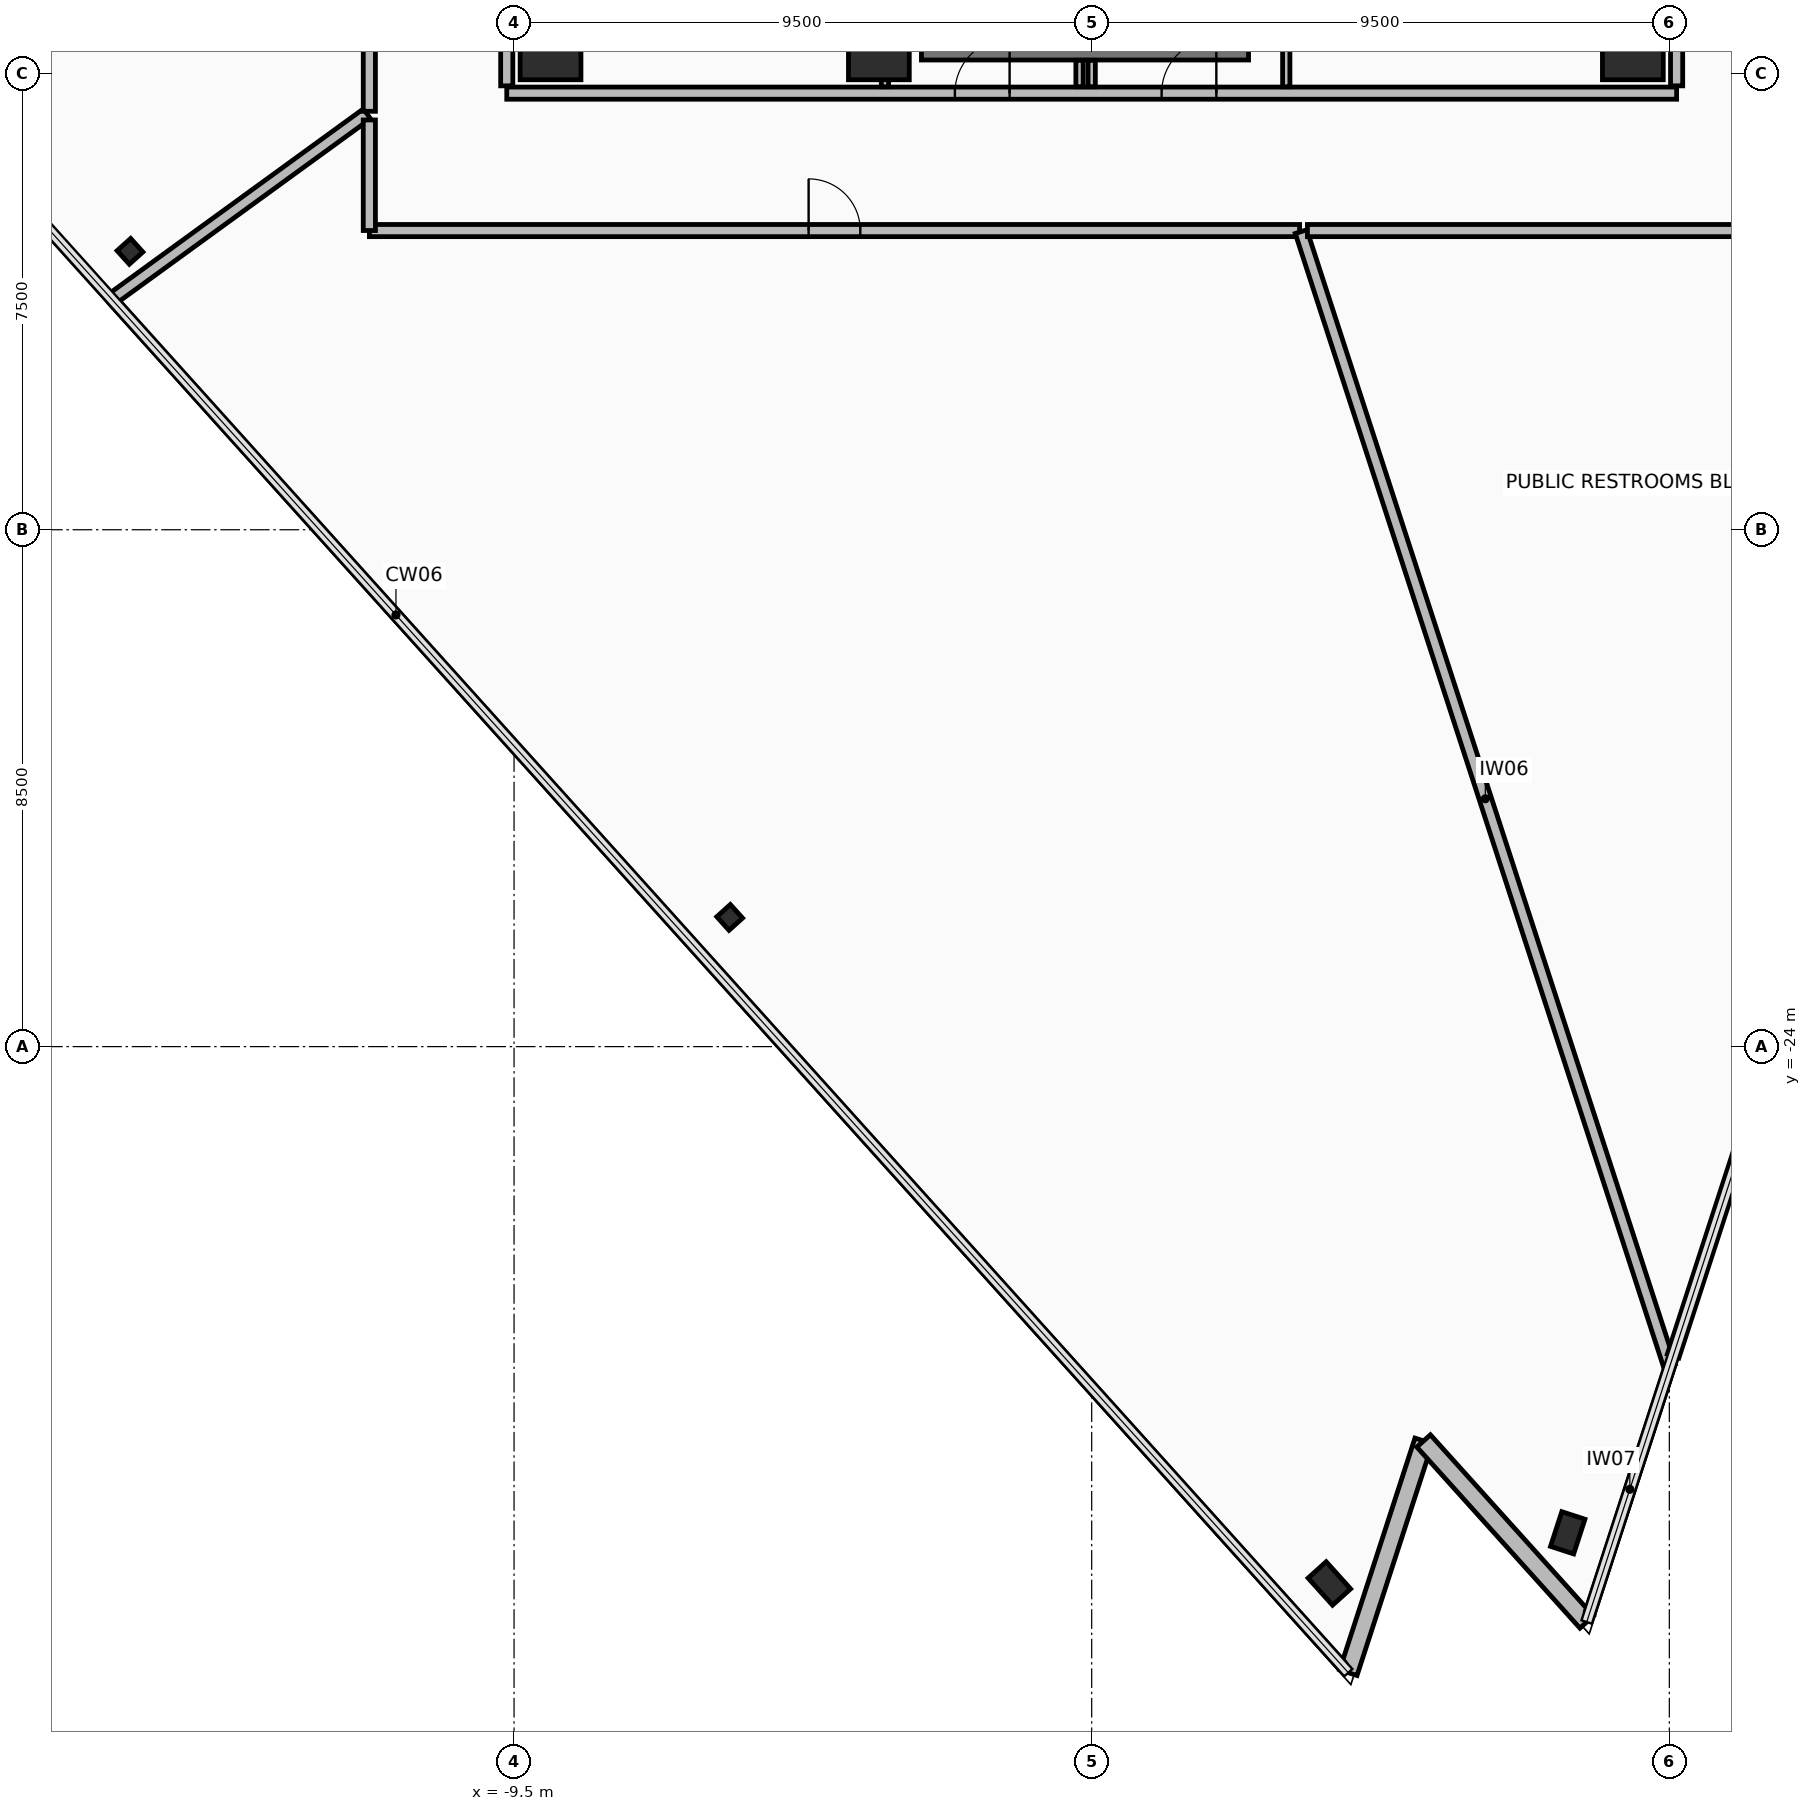
"""IFC4 building model, lengths in metres.
Left out: names, types, materials, properties, quantities, classifications, styles, units other than length and angle.
Written with IfcOpenShell. Run it as: python <this file> out.ifc"""

import sys

from ifc_helpers import new_model, si_unit, direction, frame, frame_2d, origin, origin_2d, place, context, subcontext, project, spatial, rectangle, hollow_rectangle, extrude, element, fill, save


model = new_model("IFC4")
c1 = context("Model", 3, precision=1e-05, world=origin(), true_north=direction((0.0, 1.0)))
c2 = subcontext(c1, "Body", "Model", "MODEL_VIEW")
j1 = project(units=[si_unit("LENGTHUNIT", "METRE"), si_unit("PLANEANGLEUNIT", "RADIAN")], contexts=[c1])
p1 = place(None, origin())
s1 = spatial("IfcSite", under=j1, at=p1, CompositionType="ELEMENT")
p2 = place(p1, origin())
s2 = spatial("IfcBuilding", under=s1, at=p2, CompositionType="ELEMENT")
p3 = place(p2, frame((0.0, 0.0, 302.15)))
s3 = spatial("IfcBuildingStorey", under=s2, at=p3, CompositionType="ELEMENT", Elevation=302.15)
for number, where, z_axis, x_axis in (
    (1, (-8.9, -7.6, 0.0), (0.0, 0.0, 1.0), (1.0, 0.0, 0.0)),
    (2, (-3.5, -7.6, 0.0), (0.0, 0.0, 1.0), (1.0, 0.0, 0.0)),
    (3, (8.9, -7.6, 0.0), (0.0, 0.0, 1.0), (1.0, 0.0, 0.0)),
):
    element("IfcColumn", number, at=place(p3, frame(where, z_axis=z_axis, x_axis=x_axis)), inside=s3, PredefinedType="COLUMN", context=c2, shape_type="SweptSolid", body=[
        extrude(rectangle(XDim=1.0, YDim=1.0, at=origin_2d()), origin(), (0.0, 0.0, 1.0), 4.15),
    ])
for number, where, z_axis, x_axis in (
    (4, (-15.816, -10.922, 0.0), (0.0, 0.0, 1.0), (-0.669, 0.743, 0.0)),
    (5, (-5.954, -21.875, 0.0), (0.0, 0.0, 1.0), (-0.669, 0.743, 0.0)),
):
    element("IfcColumn", number, at=place(p3, frame(where, z_axis=z_axis, x_axis=x_axis)), inside=s3, PredefinedType="COLUMN", context=c2, shape_type="SweptSolid", body=[
        extrude(hollow_rectangle(XDim=0.3, YDim=0.3, WallThickness=0.02, at=origin_2d()), origin(), (0.0, 0.0, 1.0), 4.15),
    ])
for number, where, z_axis, x_axis in (
    (6, (3.909, -32.829, 0.0), (0.0, 0.0, 1.0), (-0.669, 0.743, 0.0)),
    (7, (7.829, -31.996, 0.0), (0.0, 0.0, 1.0), (0.309, 0.951, 0.0)),
):
    element("IfcColumn", number, at=place(p3, frame(where, z_axis=z_axis, x_axis=x_axis)), inside=s3, PredefinedType="COLUMN", context=c2, shape_type="SweptSolid", body=[
        extrude(hollow_rectangle(XDim=0.4, YDim=0.6, WallThickness=0.03, at=origin_2d()), origin(), (0.0, 0.0, 1.0), 4.15),
    ])
p4 = place(p3, frame((4.221, -34.296, 0.0), z_axis=(0.0, 0.0, 1.0), x_axis=(0.309018580232, 0.951056001018, 0.0)))
e8 = element("IfcWall", 8, at=p4, inside=s3, PredefinedType="STANDARD", context=c2, shape_type="SweptSolid", body=[
    extrude(rectangle(XDim=4.008, YDim=0.3, at=frame_2d((2.004, 0.0))), origin(), (0.0, 0.0, 1.0), 3.295),
])
p5 = place(p3, frame((5.459, -30.484, 0.0), z_axis=(0.0, 0.0, 1.0), x_axis=(0.669132983361, -0.743142685208, 0.0)))
e9 = element("IfcWall", 9, at=p5, inside=s3, PredefinedType="STANDARD", context=c2, shape_type="SweptSolid", body=[
    extrude(rectangle(XDim=4.008, YDim=0.3, at=frame_2d((2.004, 0.0))), origin(), (0.0, 0.0, 1.0), 3.295),
])
p6 = place(p3, frame((-2.8, -7.6, 0.0), z_axis=(0.0, 0.0, 1.0), x_axis=(1.0, 0.0, 0.0)))
e10 = element("IfcWall", 10, at=p6, inside=s3, PredefinedType="SHEAR", context=c2, shape_type="SweptSolid", body=[
    extrude(rectangle(XDim=5.38, YDim=0.35, at=frame_2d((2.69, 0.0))), origin(), (0.0, 0.0, 1.0), 3.95),
])
p7 = place(p3, frame((-9.62, -8.32, 0.0), z_axis=(0.0, 0.0, 1.0), x_axis=(1.0, 0.0, 0.0)))
e11 = element("IfcWall", 11, at=p7, inside=s3, PredefinedType="PARTITIONING", context=c2, shape_type="SweptSolid", body=[
    extrude(rectangle(XDim=19.24, YDim=0.2, at=frame_2d((9.62, 0.0))), origin(), (0.0, 0.0, 1.0), 3.445),
])
p8 = place(p7, frame((7.37, 0.0, 0.0)))
e12 = element("IfcOpeningElement", 12, at=p8, cuts=e11, PredefinedType="OPENING", context=c2, shape_type="SweptSolid", body=[
    extrude(rectangle(XDim=0.9, YDim=2.1, at=frame_2d((0.45, 1.05))), frame((0.0, 0.11, 0.0), z_axis=(0.0, -1.0, 0.0), x_axis=(1.0, 0.0, 0.0)), (0.0, 0.0, 1.0), 0.22),
])
p9 = place(p7, frame((10.77, 0.0, 0.0)))
e13 = element("IfcOpeningElement", 13, at=p9, cuts=e11, PredefinedType="OPENING", context=c2, shape_type="SweptSolid", body=[
    extrude(rectangle(XDim=0.9, YDim=2.1, at=frame_2d((0.45, 1.05))), frame((0.0, 0.11, 0.0), z_axis=(0.0, -1.0, 0.0), x_axis=(1.0, 0.0, 0.0)), (0.0, 0.0, 1.0), 0.22),
])
p10 = place(p3, frame((-9.62, 8.2, 0.0), z_axis=(0.0, 0.0, 1.0), x_axis=(0.0, -1.0, 0.0)))
e14 = element("IfcWall", 14, at=p10, inside=s3, PredefinedType="PARTITIONING", context=c2, shape_type="SweptSolid", body=[
    extrude(rectangle(XDim=16.4, YDim=0.2, at=frame_2d((8.2, 0.0))), origin(), (0.0, 0.0, 1.0), 3.445),
])
p11 = place(p10, frame((12.65, 0.0, 0.0)))
e15 = element("IfcOpeningElement", 15, at=p11, cuts=e14, PredefinedType="OPENING", context=c2, shape_type="SweptSolid", body=[
    extrude(rectangle(XDim=1.1, YDim=2.15, at=frame_2d((0.55, 1.075))), frame((0.0, 0.11, 0.0), z_axis=(0.0, -1.0, 0.0), x_axis=(1.0, 0.0, 0.0)), (0.0, 0.0, 1.0), 0.22),
])
p12 = place(p3, frame((9.62, -8.2, 0.0), z_axis=(0.0, 0.0, 1.0), x_axis=(0.0, 1.0, 0.0)))
e16 = element("IfcWall", 16, at=p12, inside=s3, PredefinedType="PARTITIONING", context=c2, shape_type="SweptSolid", body=[
    extrude(rectangle(XDim=16.4, YDim=0.2, at=frame_2d((8.2, 0.0))), origin(), (0.0, 0.0, 1.0), 3.445),
])
p13 = place(p12, frame((12.65, 0.0, 0.0)))
e17 = element("IfcOpeningElement", 17, at=p13, cuts=e16, PredefinedType="OPENING", context=c2, shape_type="SweptSolid", body=[
    extrude(rectangle(XDim=1.1, YDim=2.15, at=frame_2d((0.55, 1.075))), frame((0.0, 0.11, 0.0), z_axis=(0.0, -1.0, 0.0), x_axis=(1.0, 0.0, 0.0)), (0.0, 0.0, 1.0), 0.22),
])
p14 = place(p3, frame((-0.2, -8.215, 0.0), z_axis=(0.0, 0.0, 1.0), x_axis=(0.0, 1.0, 0.0)))
e18 = element("IfcWall", 18, at=p14, inside=s3, PredefinedType="PARTITIONING", context=c2, shape_type="SweptSolid", body=[
    extrude(rectangle(XDim=0.435, YDim=0.12, at=frame_2d((0.218, 0.0))), origin(), (0.0, 0.0, 1.0), 3.245),
])
p15 = place(p3, frame((-3.4, -5.415, 0.0), z_axis=(0.0, 0.0, 1.0), x_axis=(0.0, -1.0, 0.0)))
e19 = element("IfcWall", 19, at=p15, inside=s3, PredefinedType="PARTITIONING", context=c2, shape_type="SweptSolid", body=[
    extrude(rectangle(XDim=2.8, YDim=0.12, at=frame_2d((1.4, 0.0))), origin(), (0.0, 0.0, 1.0), 3.245),
])
p16 = place(p3, frame((3.2, -8.215, 0.0), z_axis=(0.0, 0.0, 1.0), x_axis=(0.0, 1.0, 0.0)))
e20 = element("IfcWall", 20, at=p16, inside=s3, PredefinedType="PARTITIONING", context=c2, shape_type="SweptSolid", body=[
    extrude(rectangle(XDim=2.865, YDim=0.12, at=frame_2d((1.433, 0.0))), origin(), (0.0, 0.0, 1.0), 3.245),
])
p17 = place(p3, frame((0.0, -7.78, 0.0), z_axis=(0.0, 0.0, 1.0), x_axis=(0.0, -1.0, 0.0)))
e21 = element("IfcWall", 21, at=p17, inside=s3, PredefinedType="PARTITIONING", context=c2, shape_type="SweptSolid", body=[
    extrude(rectangle(XDim=0.435, YDim=0.12, at=frame_2d((0.218, 0.0))), origin(), (0.0, 0.0, 1.0), 3.245),
])
p18 = place(p3, frame((-11.879, -10.58, 0.0), z_axis=(0.0, 0.0, 1.0), x_axis=(1.0, 0.0, 0.0)))
e22 = element("IfcWall", 22, at=p18, inside=s3, PredefinedType="PARTITIONING", context=c2, shape_type="SweptSolid", body=[
    extrude(rectangle(XDim=15.299, YDim=0.2, at=frame_2d((7.649, 0.0))), origin(), (0.0, 0.0, 1.0), 3.445),
])
p19 = place(p18, frame((7.224, 0.0, 0.0)))
e23 = element("IfcOpeningElement", 23, at=p19, cuts=e22, PredefinedType="OPENING", context=c2, shape_type="SweptSolid", body=[
    extrude(rectangle(XDim=0.85, YDim=2.1, at=frame_2d((0.425, 1.05))), frame((0.0, 0.11, 0.0), z_axis=(0.0, -1.0, 0.0), x_axis=(1.0, 0.0, 0.0)), (0.0, 0.0, 1.0), 0.22),
])
p20 = place(p3, frame((3.443, -10.597, 0.0), z_axis=(0.0, 0.0, 1.0), x_axis=(0.309011768736, -0.951058214192, 0.0)))
e24 = element("IfcWall", 24, at=p20, inside=s3, PredefinedType="PARTITIONING", context=c2, shape_type="SweptSolid", body=[
    extrude(rectangle(XDim=19.614, YDim=0.2, at=frame_2d((9.807, 0.0))), origin(), (0.0, 0.0, 1.0), 3.295),
])
p21 = place(p3, frame((9.504, -29.267, 0.0), z_axis=(0.0, 0.0, 1.0), x_axis=(-0.30900259688, -0.951061194204, 0.0)))
e25 = element("IfcWall", 25, at=p21, inside=s3, PredefinedType="PARTITIONING", context=c2, shape_type="SweptSolid", body=[
    extrude(rectangle(XDim=4.232, YDim=0.15, at=frame_2d((2.116, 0.0))), origin(), (0.0, 0.0, 1.0), 3.95),
])
p22 = place(p3, frame((4.101, -34.163, 0.0), z_axis=(0.0, 0.0, 1.0), x_axis=(-0.669132723426, 0.743142919256, 0.0)))
e26 = element("IfcWall", 26, at=p22, inside=s3, PredefinedType="PARTITIONING", context=c2, shape_type="SweptSolid", body=[
    extrude(rectangle(XDim=30.187, YDim=0.15, at=frame_2d((15.093, 0.0))), origin(), (0.0, 0.0, 1.0), 3.95),
])
p23 = place(p3, frame((-16.094, -11.693, 0.0), z_axis=(0.0, 0.0, 1.0), x_axis=(0.809026537752, 0.587772116736, 0.0)))
e27 = element("IfcWall", 27, at=p23, inside=s3, PredefinedType="PARTITIONING", context=c2, shape_type="SweptSolid", body=[
    extrude(rectangle(XDim=5.16, YDim=0.2, at=frame_2d((2.58, 0.0))), origin(), (0.0, 0.0, 1.0), 3.295),
])
p24 = place(p3, frame((-11.88, -8.761, 0.0), z_axis=(0.0, 0.0, 1.0), x_axis=(0.0, -1.0, 0.0)))
e28 = element("IfcWall", 28, at=p24, inside=s3, PredefinedType="PARTITIONING", context=c2, shape_type="SweptSolid", body=[
    extrude(rectangle(XDim=1.818, YDim=0.2, at=frame_2d((0.909, 0.0))), origin(), (0.0, 0.0, 1.0), 3.445),
])
p25 = place(p3, frame((3.548, -10.58, 0.0), z_axis=(0.0, 0.0, 1.0), x_axis=(1.0, 0.0, 0.0)))
e29 = element("IfcWall", 29, at=p25, inside=s3, PredefinedType="PARTITIONING", context=c2, shape_type="SweptSolid", body=[
    extrude(rectangle(XDim=8.331, YDim=0.2, at=frame_2d((4.166, 0.0))), origin(), (0.0, 0.0, 1.0), 3.445),
])
p26 = place(p3, frame((18.298, -2.205, 0.0), z_axis=(0.0, 0.0, 1.0), x_axis=(-0.309026118402, -0.951053551671, 0.0)))
e30 = element("IfcWall", 30, at=p26, inside=s3, PredefinedType="PARTITIONING", context=c2, shape_type="SweptSolid", body=[
    extrude(rectangle(XDim=28.268, YDim=0.2, at=frame_2d((14.134, 0.0))), origin(), (0.0, 0.0, 1.0), 3.95),
])
p27 = place(p3, frame((-11.88, 9.646, 0.0), z_axis=(0.0, 0.0, 1.0), x_axis=(0.0, -1.0, 0.0)))
e31 = element("IfcWall", 31, at=p27, inside=s3, PredefinedType="PARTITIONING", context=c2, shape_type="SweptSolid", body=[
    extrude(rectangle(XDim=18.264, YDim=0.2, at=frame_2d((9.132, 0.0))), origin(), (0.0, 0.0, 1.0), 3.295),
])
p28 = place(p27, frame((8.332, 0.0, 0.0)))
e32 = element("IfcOpeningElement", 32, at=p28, cuts=e31, PredefinedType="OPENING", context=c2, shape_type="SweptSolid", body=[
    extrude(rectangle(XDim=1.6, YDim=2.2, at=frame_2d((0.8, 1.1))), frame((0.0, 0.11, 0.0), z_axis=(0.0, -1.0, 0.0), x_axis=(1.0, 0.0, 0.0)), (0.0, 0.0, 1.0), 0.22),
])
p29 = place(p8, frame((0.9, 0.0, 0.0), z_axis=(0.0, 0.0, 1.0), x_axis=(-1.0, 0.0, 0.0)))
e33 = element("IfcDoor", 33, at=p29, inside=s3, OperationType="SINGLE_SWING_LEFT", PredefinedType="DOOR", context=c2, shape_type="SweptSolid", body=[
    extrude(rectangle(XDim=0.9, YDim=2.1, at=frame_2d((0.45, 1.05))), frame((0.0, 0.025, 0.0), z_axis=(0.0, -1.0, 0.0), x_axis=(1.0, 0.0, 0.0)), (0.0, 0.0, 1.0), 0.05),
])
fill(e12, e33)
p30 = place(p9, frame((0.9, 0.0, 0.0), z_axis=(0.0, 0.0, 1.0), x_axis=(-1.0, 0.0, 0.0)))
e34 = element("IfcDoor", 34, at=p30, inside=s3, OperationType="SINGLE_SWING_LEFT", PredefinedType="DOOR", context=c2, shape_type="SweptSolid", body=[
    extrude(rectangle(XDim=0.9, YDim=2.1, at=frame_2d((0.45, 1.05))), frame((0.0, 0.025, 0.0), z_axis=(0.0, -1.0, 0.0), x_axis=(1.0, 0.0, 0.0)), (0.0, 0.0, 1.0), 0.05),
])
fill(e13, e34)
p31 = place(p19, origin())
e35 = element("IfcDoor", 35, at=p31, inside=s3, OperationType="SINGLE_SWING_RIGHT", PredefinedType="DOOR", context=c2, shape_type="SweptSolid", body=[
    extrude(rectangle(XDim=0.85, YDim=2.1, at=frame_2d((0.425, 1.05))), frame((0.0, 0.025, 0.0), z_axis=(0.0, -1.0, 0.0), x_axis=(1.0, 0.0, 0.0)), (0.0, 0.0, 1.0), 0.05),
])
fill(e23, e35)
save(model, sys.argv[1])
